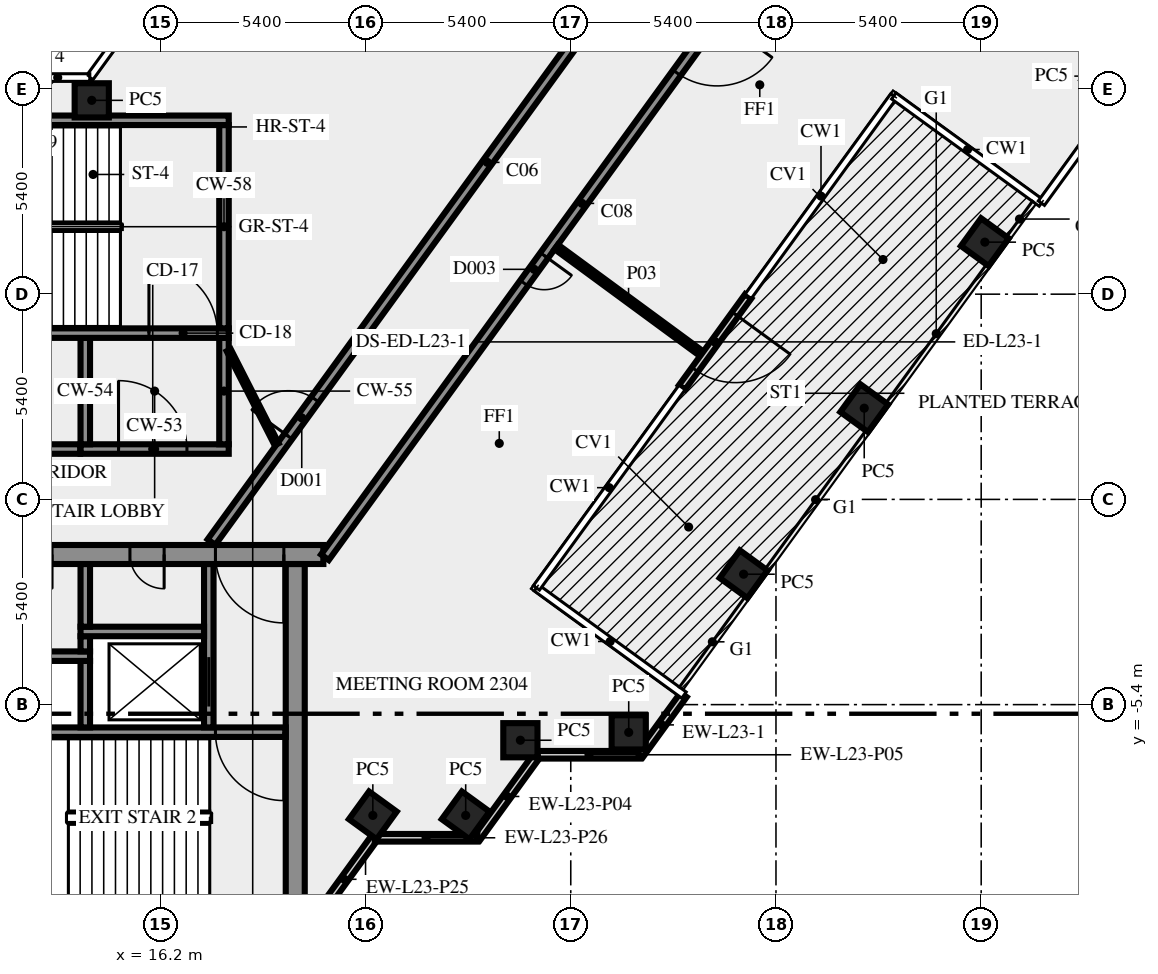
"""IFC4 building model, lengths in metres.
Left out: names, types, materials, properties, quantities, classifications, styles, units other than length and angle.
Written with IfcOpenShell. Run it as: python <this file> out.ifc"""

import sys

from ifc_helpers import new_model, si_unit, direction, frame, frame_2d, origin, origin_2d, place, context, subcontext, project, spatial, rectangle, extrude, element, fill, save


model = new_model("IFC4")
c1 = context("Model", 3, precision=1e-05, world=origin(), true_north=direction((0.0, 1.0)))
c2 = subcontext(c1, "Body", "Model", "MODEL_VIEW")
j1 = project(units=[si_unit("LENGTHUNIT", "METRE"), si_unit("PLANEANGLEUNIT", "RADIAN")], contexts=[c1])
p1 = place(None, origin())
s1 = spatial("IfcSite", under=j1, at=p1, CompositionType="ELEMENT")
p2 = place(p1, origin())
s2 = spatial("IfcBuilding", under=s1, at=p2, CompositionType="ELEMENT")
p3 = place(p2, frame((0.0, 0.0, 101.0)))
s3 = spatial("IfcBuildingStorey", under=s2, at=p3, CompositionType="ELEMENT", Elevation=101.0)
for number, where, z_axis, x_axis in (
    (1, (21.792, -8.315, 0.0), (0.0, 0.0, 1.0), (0.588, 0.809, 0.0)),
    (2, (24.235, -8.315, 0.0), (0.0, 0.0, 1.0), (0.588, 0.809, 0.0)),
    (3, (25.674, -6.337, 0.0), (0.0, 0.0, 1.0), (1.0, 0.0, 0.0)),
    (4, (28.525, -6.13, 0.0), (0.0, 0.0, 1.0), (1.0, 0.0, 0.0)),
    (5, (31.548, -1.969, 0.0), (0.0, 0.0, 1.0), (0.588, 0.809, 0.0)),
    (6, (34.722, 2.4, 0.0), (0.0, 0.0, 1.0), (0.588, 0.809, 0.0)),
    (7, (37.896, 6.769, 0.0), (0.0, 0.0, 1.0), (0.588, 0.809, 0.0)),
    (8, (14.395, 10.5, 0.0), (0.0, 0.0, 1.0), (-1.0, 0.0, 0.0)),
):
    element("IfcColumn", number, at=place(p3, frame(where, z_axis=z_axis, x_axis=x_axis)), inside=s3, PredefinedType="COLUMN", context=c2, shape_type="SweptSolid", body=[
        extrude(rectangle(XDim=0.9, YDim=0.9, at=origin_2d()), origin(), (0.0, 0.0, 1.0), 3.65),
    ])
p4 = place(p3, frame((24.533, -8.909, 0.0), z_axis=(0.0, 0.0, 1.0), x_axis=(0.587720002413, 0.809064397168, 0.0)))
e9 = element("IfcWall", 9, at=p4, inside=s3, PredefinedType="SOLIDWALL", context=c2, shape_type="SweptSolid", body=[
    extrude(rectangle(XDim=2.7, YDim=0.2, at=frame_2d((1.35, 0.0))), origin(), (0.0, 0.0, 1.0), 3.65),
])
p5 = place(p3, frame((26.13, -6.719, 0.0), z_axis=(0.0, 0.0, 1.0), x_axis=(1.0, 0.0, 0.0)))
e10 = element("IfcWall", 10, at=p5, inside=s3, PredefinedType="SOLIDWALL", context=c2, shape_type="SweptSolid", body=[
    extrude(rectangle(XDim=2.7, YDim=0.2, at=frame_2d((1.35, 0.0))), origin(), (0.0, 0.0, 1.0), 3.65),
])
p6 = place(p3, frame((28.82, -6.724, 0.0), z_axis=(0.0, 0.0, 1.0), x_axis=(0.587785613349, 0.809016732052, 0.0)))
e11 = element("IfcWall", 11, at=p6, inside=s3, PredefinedType="SOLIDWALL", context=c2, shape_type="SweptSolid", body=[
    extrude(rectangle(XDim=1.956, YDim=0.2, at=frame_2d((0.978, 0.0))), origin(), (0.0, 0.0, 1.0), 3.65),
])
p7 = place(p3, frame((31.669, 5.343, 0.0), z_axis=(0.0, 0.0, 1.0), x_axis=(-0.58782869016, -0.808985433135, 0.0)))
e12 = element("IfcWall", 12, at=p7, inside=s3, PredefinedType="SOLIDWALL", context=c2, shape_type="SweptSolid", body=[
    extrude(rectangle(XDim=2.963, YDim=0.2, at=frame_2d((1.481, 0.0))), origin(), (0.0, 0.0, 1.0), 3.65),
])
p8 = place(p7, frame((0.582, 0.0, 0.0)))
e13 = element("IfcOpeningElement", 13, at=p8, cuts=e12, PredefinedType="OPENING", context=c2, shape_type="SweptSolid", body=[
    extrude(rectangle(XDim=1.8, YDim=2.4, at=frame_2d((0.9, 1.2))), frame((0.0, 0.11, 0.0), z_axis=(0.0, -1.0, 0.0), x_axis=(1.0, 0.0, 0.0)), (0.0, 0.0, 1.0), 0.22),
])
p9 = place(p3, frame((20.253, -11.083, 0.0), z_axis=(0.0, 0.0, 1.0), x_axis=(0.587766567315, 0.809030569476, 0.0)))
e14 = element("IfcWall", 14, at=p9, inside=s3, PredefinedType="SOLIDWALL", context=c2, shape_type="SweptSolid", body=[
    extrude(rectangle(XDim=2.688, YDim=0.2, at=frame_2d((1.344, 0.0))), origin(), (0.0, 0.0, 1.0), 3.65),
])
p10 = place(p3, frame((21.843, -8.904, 0.0), z_axis=(0.0, 0.0, 1.0), x_axis=(1.0, 0.0, 0.0)))
e15 = element("IfcWall", 15, at=p10, inside=s3, PredefinedType="SOLIDWALL", context=c2, shape_type="SweptSolid", body=[
    extrude(rectangle(XDim=2.7, YDim=0.2, at=frame_2d((1.35, 0.0))), origin(), (0.0, 0.0, 1.0), 3.65),
])
p11 = place(p3, frame((19.75, -10.5, 0.0), z_axis=(0.0, 0.0, 1.0), x_axis=(0.0, 1.0, 0.0)))
e16 = element("IfcWall", 16, at=p11, inside=s3, PredefinedType="SHEAR", context=c2, shape_type="SweptSolid", body=[
    extrude(rectangle(XDim=8.8, YDim=0.5, at=frame_2d((4.4, 0.0))), origin(), (0.0, 0.0, 1.0), 3.65),
])
p12 = place(p3, frame((19.5, -6.125, 0.0), z_axis=(0.0, 0.0, 1.0), x_axis=(-1.0, 0.0, 0.0)))
e17 = element("IfcWall", 17, at=p12, inside=s3, PredefinedType="SHEAR", context=c2, shape_type="SweptSolid", body=[
    extrude(rectangle(XDim=8.05, YDim=0.25, at=frame_2d((4.025, 0.0))), origin(), (0.0, 0.0, 1.0), 3.65),
])
p13 = place(p12, frame((0.05, 0.0, 0.0)))
e18 = element("IfcOpeningElement", 18, at=p13, cuts=e17, PredefinedType="OPENING", context=c2, shape_type="SweptSolid", body=[
    extrude(rectangle(XDim=1.8, YDim=2.1, at=frame_2d((0.9, 1.05))), frame((0.0, 0.135, 0.0), z_axis=(0.0, -1.0, 0.0), x_axis=(1.0, 0.0, 0.0)), (0.0, 0.0, 1.0), 0.27),
])
p14 = place(p3, frame((14.225, -6.0, 0.0), z_axis=(0.0, 0.0, 1.0), x_axis=(0.0, 1.0, 0.0)))
e19 = element("IfcWall", 19, at=p14, inside=s3, PredefinedType="SHEAR", context=c2, shape_type="SweptSolid", body=[
    extrude(rectangle(XDim=1.75, YDim=0.25, at=frame_2d((0.875, 0.0))), origin(), (0.0, 0.0, 1.0), 3.65),
])
p15 = place(p3, frame((17.475, -6.0, 0.0), z_axis=(0.0, 0.0, 1.0), x_axis=(0.0, 1.0, 0.0)))
e20 = element("IfcWall", 20, at=p15, inside=s3, PredefinedType="SHEAR", context=c2, shape_type="SweptSolid", body=[
    extrude(rectangle(XDim=4.3, YDim=0.25, at=frame_2d((2.15, 0.0))), origin(), (0.0, 0.0, 1.0), 3.65),
])
p16 = place(p15, frame((0.55, 0.0, 0.0)))
e21 = element("IfcOpeningElement", 21, at=p16, cuts=e20, PredefinedType="OPENING", context=c2, shape_type="SweptSolid", body=[
    extrude(rectangle(XDim=1.3, YDim=2.1, at=frame_2d((0.65, 1.05))), frame((0.0, 0.135, 0.0), z_axis=(0.0, -1.0, 0.0), x_axis=(1.0, 0.0, 0.0)), (0.0, 0.0, 1.0), 0.27),
])
p17 = place(p3, frame((1.45, -4.125, 0.0), z_axis=(0.0, 0.0, 1.0), x_axis=(1.0, 0.0, 0.0)))
e22 = element("IfcWall", 22, at=p17, inside=s3, PredefinedType="SHEAR", context=c2, shape_type="SweptSolid", body=[
    extrude(rectangle(XDim=12.9, YDim=0.25, at=frame_2d((6.45, 0.0))), origin(), (0.0, 0.0, 1.0), 3.65),
])
p18 = place(p17, frame((0.7, 0.0, 0.0)))
e23 = element("IfcOpeningElement", 23, at=p18, cuts=e22, PredefinedType="OPENING", context=c2, shape_type="SweptSolid", body=[
    extrude(rectangle(XDim=1.3, YDim=2.1, at=frame_2d((0.65, 1.05))), frame((0.0, 0.135, 0.0), z_axis=(0.0, -1.0, 0.0), x_axis=(1.0, 0.0, 0.0)), (0.0, 0.0, 1.0), 0.27),
])
p19 = place(p3, frame((14.225, -4.0, 0.0), z_axis=(0.0, 0.0, 1.0), x_axis=(0.0, 1.0, 0.0)))
e24 = element("IfcWall", 24, at=p19, inside=s3, PredefinedType="SHEAR", context=c2, shape_type="SweptSolid", body=[
    extrude(rectangle(XDim=0.4, YDim=0.25, at=frame_2d((0.2, 0.0))), origin(), (0.0, 0.0, 1.0), 3.65),
])
p20 = place(p3, frame((14.1, -3.475, 0.0), z_axis=(0.0, 0.0, 1.0), x_axis=(1.0, 0.0, 0.0)))
e25 = element("IfcWall", 25, at=p20, inside=s3, PredefinedType="SHEAR", context=c2, shape_type="SweptSolid", body=[
    extrude(rectangle(XDim=3.25, YDim=0.25, at=frame_2d((1.625, 0.0))), origin(), (0.0, 0.0, 1.0), 3.65),
])
p21 = place(p3, frame((14.225, -3.35, 0.0), z_axis=(0.0, 0.0, 1.0), x_axis=(0.0, 1.0, 0.0)))
e26 = element("IfcWall", 26, at=p21, inside=s3, PredefinedType="SHEAR", context=c2, shape_type="SweptSolid", body=[
    extrude(rectangle(XDim=1.65, YDim=0.25, at=frame_2d((0.825, 0.0))), origin(), (0.0, 0.0, 1.0), 3.65),
])
p22 = place(p3, frame((20.49, -1.45, 0.0), z_axis=(0.0, 0.0, 1.0), x_axis=(-1.0, 0.0, 0.0)))
e27 = element("IfcWall", 27, at=p22, inside=s3, PredefinedType="SHEAR", context=c2, shape_type="SweptSolid", body=[
    extrude(rectangle(XDim=40.98, YDim=0.5, at=frame_2d((20.49, 0.0))), origin(), (0.0, 0.0, 1.0), 3.65),
])
p23 = place(p22, frame((38.14, 0.0, 0.0)))
e28 = element("IfcOpeningElement", 28, at=p23, cuts=e27, PredefinedType="OPENING", context=c2, shape_type="SweptSolid", body=[
    extrude(rectangle(XDim=1.8, YDim=2.1, at=frame_2d((0.9, 1.05))), frame((0.0, 0.26, 0.0), z_axis=(0.0, -1.0, 0.0), x_axis=(1.0, 0.0, 0.0)), (0.0, 0.0, 1.0), 0.52),
])
p24 = place(p22, frame((36.728, 0.0, 0.0)))
e29 = element("IfcOpeningElement", 29, at=p24, cuts=e27, PredefinedType="OPENING", context=c2, shape_type="SweptSolid", body=[
    extrude(rectangle(XDim=0.8, YDim=2.1, at=frame_2d((0.4, 1.05))), frame((0.0, 0.26, 0.0), z_axis=(0.0, -1.0, 0.0), x_axis=(1.0, 0.0, 0.0)), (0.0, 0.0, 1.0), 0.52),
])
p25 = place(p22, frame((35.153, 0.0, 0.0)))
e30 = element("IfcOpeningElement", 30, at=p25, cuts=e27, PredefinedType="OPENING", context=c2, shape_type="SweptSolid", body=[
    extrude(rectangle(XDim=0.8, YDim=2.1, at=frame_2d((0.4, 1.05))), frame((0.0, 0.26, 0.0), z_axis=(0.0, -1.0, 0.0), x_axis=(1.0, 0.0, 0.0)), (0.0, 0.0, 1.0), 0.52),
])
p26 = place(p22, frame((32.94, 0.0, 0.0)))
e31 = element("IfcOpeningElement", 31, at=p26, cuts=e27, PredefinedType="OPENING", context=c2, shape_type="SweptSolid", body=[
    extrude(rectangle(XDim=0.9, YDim=2.1, at=frame_2d((0.45, 1.05))), frame((0.0, 0.26, 0.0), z_axis=(0.0, -1.0, 0.0), x_axis=(1.0, 0.0, 0.0)), (0.0, 0.0, 1.0), 0.52),
])
p27 = place(p22, frame((19.59, 0.0, 0.0)))
e32 = element("IfcOpeningElement", 32, at=p27, cuts=e27, PredefinedType="OPENING", context=c2, shape_type="SweptSolid", body=[
    extrude(rectangle(XDim=2.0, YDim=2.1, at=frame_2d((1.0, 1.05))), frame((0.0, 0.26, 0.0), z_axis=(0.0, -1.0, 0.0), x_axis=(1.0, 0.0, 0.0)), (0.0, 0.0, 1.0), 0.52),
])
p28 = place(p22, frame((7.14, 0.0, 0.0)))
e33 = element("IfcOpeningElement", 33, at=p28, cuts=e27, PredefinedType="OPENING", context=c2, shape_type="SweptSolid", body=[
    extrude(rectangle(XDim=0.9, YDim=2.1, at=frame_2d((0.45, 1.05))), frame((0.0, 0.26, 0.0), z_axis=(0.0, -1.0, 0.0), x_axis=(1.0, 0.0, 0.0)), (0.0, 0.0, 1.0), 0.52),
])
p29 = place(p22, frame((4.19, 0.0, 0.0)))
e34 = element("IfcOpeningElement", 34, at=p29, cuts=e27, PredefinedType="OPENING", context=c2, shape_type="SweptSolid", body=[
    extrude(rectangle(XDim=0.9, YDim=2.1, at=frame_2d((0.45, 1.05))), frame((0.0, 0.26, 0.0), z_axis=(0.0, -1.0, 0.0), x_axis=(1.0, 0.0, 0.0)), (0.0, 0.0, 1.0), 0.52),
])
p30 = place(p22, frame((1.04, 0.0, 0.0)))
e35 = element("IfcOpeningElement", 35, at=p30, cuts=e27, PredefinedType="OPENING", context=c2, shape_type="SweptSolid", body=[
    extrude(rectangle(XDim=1.8, YDim=2.1, at=frame_2d((0.9, 1.05))), frame((0.0, 0.26, 0.0), z_axis=(0.0, -1.0, 0.0), x_axis=(1.0, 0.0, 0.0)), (0.0, 0.0, 1.0), 0.52),
])
p31 = place(p3, frame((14.1, 1.325, 0.0), z_axis=(0.0, 0.0, 1.0), x_axis=(1.0, 0.0, 0.0)))
e36 = element("IfcWall", 36, at=p31, inside=s3, PredefinedType="SHEAR", context=c2, shape_type="SweptSolid", body=[
    extrude(rectangle(XDim=3.9, YDim=0.25, at=frame_2d((1.95, 0.0))), origin(), (0.0, 0.0, 1.0), 3.65),
])
p32 = place(p31, frame((1.0, 0.0, 0.0)))
e37 = element("IfcOpeningElement", 37, at=p32, cuts=e36, PredefinedType="OPENING", context=c2, shape_type="SweptSolid", body=[
    extrude(rectangle(XDim=1.8, YDim=2.1, at=frame_2d((0.9, 1.05))), frame((0.0, 0.135, 0.0), z_axis=(0.0, -1.0, 0.0), x_axis=(1.0, 0.0, 0.0)), (0.0, 0.0, 1.0), 0.27),
])
for number, where, z_axis, x_axis in (
    (38, (14.225, 1.45, 0.0), (0.0, 0.0, 1.0), (0.0, 1.0, 0.0)),
    (39, (17.875, 1.45, 0.0), (0.0, 0.0, 1.0), (0.0, 1.0, 0.0)),
):
    element("IfcWall", number, at=place(p3, frame(where, z_axis=z_axis, x_axis=x_axis)), inside=s3, PredefinedType="SHEAR", context=c2, shape_type="SweptSolid", body=[
        extrude(rectangle(XDim=2.8, YDim=0.25, at=frame_2d((1.4, 0.0))), origin(), (0.0, 0.0, 1.0), 3.65),
    ])
p33 = place(p3, frame((7.5, 4.375, 0.0), z_axis=(0.0, 0.0, 1.0), x_axis=(1.0, 0.0, 0.0)))
e40 = element("IfcWall", 40, at=p33, inside=s3, PredefinedType="SHEAR", context=c2, shape_type="SweptSolid", body=[
    extrude(rectangle(XDim=10.5, YDim=0.25, at=frame_2d((5.25, 0.0))), origin(), (0.0, 0.0, 1.0), 3.65),
])
p34 = place(p33, frame((8.4, 0.0, 0.0)))
e41 = element("IfcOpeningElement", 41, at=p34, cuts=e40, PredefinedType="OPENING", context=c2, shape_type="SweptSolid", body=[
    extrude(rectangle(XDim=1.8, YDim=2.1, at=frame_2d((0.9, 1.05))), frame((0.0, 0.135, 0.0), z_axis=(0.0, -1.0, 0.0), x_axis=(1.0, 0.0, 0.0)), (0.0, 0.0, 1.0), 0.27),
])
p35 = place(p3, frame((17.875, 4.5, 0.0), z_axis=(0.0, 0.0, 1.0), x_axis=(0.0, 1.0, 0.0)))
e42 = element("IfcWall", 42, at=p35, inside=s3, PredefinedType="SHEAR", context=c2, shape_type="SweptSolid", body=[
    extrude(rectangle(XDim=5.35, YDim=0.25, at=frame_2d((2.675, 0.0))), origin(), (0.0, 0.0, 1.0), 3.65),
])
p36 = place(p3, frame((7.5, 9.975, 0.0), z_axis=(0.0, 0.0, 1.0), x_axis=(1.0, 0.0, 0.0)))
e43 = element("IfcWall", 43, at=p36, inside=s3, PredefinedType="SHEAR", context=c2, shape_type="SweptSolid", body=[
    extrude(rectangle(XDim=10.5, YDim=0.25, at=frame_2d((5.25, 0.0))), origin(), (0.0, 0.0, 1.0), 3.65),
])
p37 = place(p36, frame((2.0, 0.0, 1.0)))
e44 = element("IfcOpeningElement", 44, at=p37, cuts=e43, PredefinedType="OPENING", context=c2, shape_type="SweptSolid", body=[
    extrude(rectangle(XDim=1.2, YDim=1.2, at=frame_2d((0.6, 0.6))), frame((0.0, 0.135, 0.0), z_axis=(0.0, -1.0, 0.0), x_axis=(1.0, 0.0, 0.0)), (0.0, 0.0, 1.0), 0.27),
])
p38 = place(p3, frame((-14.09, 1.325, 0.0), z_axis=(0.0, 0.0, 1.0), x_axis=(1.0, 0.0, 0.0)))
e45 = element("IfcWall", 45, at=p38, inside=s3, PredefinedType="SOLIDWALL", context=c2, shape_type="SweptSolid", body=[
    extrude(rectangle(XDim=28.18, YDim=0.25, at=frame_2d((14.09, 0.0))), origin(), (0.0, 0.0, 1.0), 3.65),
])
p39 = place(p38, frame((19.738, 0.0, 0.0)))
e46 = element("IfcOpeningElement", 46, at=p39, cuts=e45, PredefinedType="OPENING", context=c2, shape_type="SweptSolid", body=[
    extrude(rectangle(XDim=1.2, YDim=2.1, at=frame_2d((0.6, 1.05))), frame((0.0, 0.135, 0.0), z_axis=(0.0, -1.0, 0.0), x_axis=(1.0, 0.0, 0.0)), (0.0, 0.0, 1.0), 0.27),
])
p40 = place(p38, frame((0.34, 0.0, 0.0)))
e47 = element("IfcOpeningElement", 47, at=p40, cuts=e45, PredefinedType="OPENING", context=c2, shape_type="SweptSolid", body=[
    extrude(rectangle(XDim=0.9, YDim=2.1, at=frame_2d((0.45, 1.05))), frame((0.0, 0.135, 0.0), z_axis=(0.0, -1.0, 0.0), x_axis=(1.0, 0.0, 0.0)), (0.0, 0.0, 1.0), 0.27),
])
p41 = place(p38, frame((21.638, 0.0, 0.0)))
e48 = element("IfcOpeningElement", 48, at=p41, cuts=e45, PredefinedType="OPENING", context=c2, shape_type="SweptSolid", body=[
    extrude(rectangle(XDim=0.9, YDim=2.1, at=frame_2d((0.45, 1.05))), frame((0.0, 0.135, 0.0), z_axis=(0.0, -1.0, 0.0), x_axis=(1.0, 0.0, 0.0)), (0.0, 0.0, 1.0), 0.27),
])
p42 = place(p3, frame((17.545, -1.125, 0.0), z_axis=(0.0, 0.0, 1.0), x_axis=(0.587791430994, 0.80901250525, 0.0)))
e49 = element("IfcWall", 49, at=p42, inside=s3, PredefinedType="SOLIDWALL", context=c2, shape_type="SweptSolid", body=[
    extrude(rectangle(XDim=24.703, YDim=0.25, at=frame_2d((12.352, 0.0))), origin(), (0.0, 0.0, 1.0), 3.65),
])
p43 = place(p42, frame((3.442, 0.0, 0.0)))
e50 = element("IfcOpeningElement", 50, at=p43, cuts=e49, PredefinedType="OPENING", context=c2, shape_type="SweptSolid", body=[
    extrude(rectangle(XDim=1.2, YDim=2.1, at=frame_2d((0.6, 1.05))), frame((0.0, 0.135, 0.0), z_axis=(0.0, -1.0, 0.0), x_axis=(1.0, 0.0, 0.0)), (0.0, 0.0, 1.0), 0.27),
])
p44 = place(p42, frame((23.329, 0.0, 0.0)))
e51 = element("IfcOpeningElement", 51, at=p44, cuts=e49, PredefinedType="OPENING", context=c2, shape_type="SweptSolid", body=[
    extrude(rectangle(XDim=0.9, YDim=2.1, at=frame_2d((0.45, 1.05))), frame((0.0, 0.135, 0.0), z_axis=(0.0, -1.0, 0.0), x_axis=(1.0, 0.0, 0.0)), (0.0, 0.0, 1.0), 0.27),
])
p45 = place(p3, frame((34.062, 17.101, 0.0), z_axis=(0.0, 0.0, 1.0), x_axis=(-0.58778129431, -0.809019870003, 0.0)))
e52 = element("IfcWall", 52, at=p45, inside=s3, PredefinedType="SOLIDWALL", context=c2, shape_type="SweptSolid", body=[
    extrude(rectangle(XDim=23.021, YDim=0.25, at=frame_2d((11.51, 0.0))), origin(), (0.0, 0.0, 1.0), 3.65),
])
p46 = place(p45, frame((5.465, 0.0, 0.0)))
e53 = element("IfcOpeningElement", 53, at=p46, cuts=e52, PredefinedType="OPENING", context=c2, shape_type="SweptSolid", body=[
    extrude(rectangle(XDim=1.8, YDim=2.1, at=frame_2d((0.9, 1.05))), frame((0.0, 0.135, 0.0), z_axis=(0.0, -1.0, 0.0), x_axis=(1.0, 0.0, 0.0)), (0.0, 0.0, 1.0), 0.27),
])
p47 = place(p45, frame((13.205, 0.0, 0.0)))
e54 = element("IfcOpeningElement", 54, at=p47, cuts=e52, PredefinedType="OPENING", context=c2, shape_type="SweptSolid", body=[
    extrude(rectangle(XDim=0.9, YDim=2.1, at=frame_2d((0.45, 1.05))), frame((0.0, 0.135, 0.0), z_axis=(0.0, -1.0, 0.0), x_axis=(1.0, 0.0, 0.0)), (0.0, 0.0, 1.0), 0.27),
])
p48 = place(p3, frame((42.106, 11.54, 0.0), z_axis=(0.0, 0.0, 1.0), x_axis=(-0.808982149318, 0.587833209409, 0.0)))
e55 = element("IfcWall", 55, at=p48, inside=s3, PredefinedType="PARTITIONING", context=c2, shape_type="SweptSolid", body=[
    extrude(rectangle(XDim=9.651, YDim=0.15, at=frame_2d((4.825, 0.0))), origin(), (0.0, 0.0, 1.0), 2.75),
])
p49 = place(p3, frame((26.619, 6.643, 0.0), z_axis=(0.0, 0.0, 1.0), x_axis=(0.805845547864, -0.592125791524, 0.0)))
e56 = element("IfcWall", 56, at=p49, inside=s3, PredefinedType="PARTITIONING", context=c2, shape_type="SweptSolid", body=[
    extrude(rectangle(XDim=4.72, YDim=0.15, at=frame_2d((2.36, 0.0))), origin(), (0.0, 0.0, 1.0), 3.65),
])
p50 = place(p3, frame((18.0, 3.925, 0.0), z_axis=(0.0, 0.0, 1.0), x_axis=(0.453950796792, -0.891026752736, 0.0)))
e57 = element("IfcWall", 57, at=p50, inside=s3, PredefinedType="PARTITIONING", context=c2, shape_type="SweptSolid", body=[
    extrude(rectangle(XDim=2.778, YDim=0.12, at=frame_2d((1.389, 0.0))), origin(), (0.0, 0.0, 1.0), 3.65),
])
p51 = place(p8, origin())
e58 = element("IfcDoor", 58, at=p51, inside=s3, OperationType="DOUBLE_DOOR_SINGLE_SWING", PredefinedType="DOOR", context=c2, shape_type="SweptSolid", body=[
    extrude(rectangle(XDim=1.8, YDim=2.4, at=frame_2d((0.9, 1.2))), frame((0.0, 0.025, 0.0), z_axis=(0.0, -1.0, 0.0), x_axis=(1.0, 0.0, 0.0)), (0.0, 0.0, 1.0), 0.05),
])
fill(e13, e58)
p52 = place(p13, origin())
e59 = element("IfcDoor", 59, at=p52, inside=s3, OperationType="DOUBLE_DOOR_SINGLE_SWING", PredefinedType="DOOR", context=c2, shape_type="SweptSolid", body=[
    extrude(rectangle(XDim=1.8, YDim=2.1, at=frame_2d((0.9, 1.05))), frame((0.0, 0.025, 0.0), z_axis=(0.0, -1.0, 0.0), x_axis=(1.0, 0.0, 0.0)), (0.0, 0.0, 1.0), 0.05),
])
fill(e18, e59)
p53 = place(p16, origin())
e60 = element("IfcDoor", 60, at=p53, inside=s3, OperationType="DOUBLE_DOOR_SLIDING", PredefinedType="DOOR", context=c2, shape_type="SweptSolid", body=[
    extrude(rectangle(XDim=1.3, YDim=2.1, at=frame_2d((0.65, 1.05))), frame((0.0, 0.025, 0.0), z_axis=(0.0, -1.0, 0.0), x_axis=(1.0, 0.0, 0.0)), (0.0, 0.0, 1.0), 0.05),
])
fill(e21, e60)
p54 = place(p29, origin())
e61 = element("IfcDoor", 61, at=p54, inside=s3, OperationType="SINGLE_SWING_LEFT", PredefinedType="DOOR", context=c2, shape_type="SweptSolid", body=[
    extrude(rectangle(XDim=0.9, YDim=2.1, at=frame_2d((0.45, 1.05))), frame((0.0, 0.025, 0.0), z_axis=(0.0, -1.0, 0.0), x_axis=(1.0, 0.0, 0.0)), (0.0, 0.0, 1.0), 0.05),
])
fill(e34, e61)
p55 = place(p30, origin())
e62 = element("IfcDoor", 62, at=p55, inside=s3, OperationType="DOUBLE_DOOR_SINGLE_SWING", PredefinedType="DOOR", context=c2, shape_type="SweptSolid", body=[
    extrude(rectangle(XDim=1.8, YDim=2.1, at=frame_2d((0.9, 1.05))), frame((0.0, 0.025, 0.0), z_axis=(0.0, -1.0, 0.0), x_axis=(1.0, 0.0, 0.0)), (0.0, 0.0, 1.0), 0.05),
])
fill(e35, e62)
p56 = place(p32, origin())
e63 = element("IfcDoor", 63, at=p56, inside=s3, OperationType="DOUBLE_DOOR_SINGLE_SWING", PredefinedType="DOOR", context=c2, shape_type="SweptSolid", body=[
    extrude(rectangle(XDim=1.8, YDim=2.1, at=frame_2d((0.9, 1.05))), frame((0.0, 0.025, 0.0), z_axis=(0.0, -1.0, 0.0), x_axis=(1.0, 0.0, 0.0)), (0.0, 0.0, 1.0), 0.05),
])
fill(e37, e63)
p57 = place(p34, origin())
e64 = element("IfcDoor", 64, at=p57, inside=s3, OperationType="DOUBLE_DOOR_SINGLE_SWING", PredefinedType="DOOR", context=c2, shape_type="SweptSolid", body=[
    extrude(rectangle(XDim=1.8, YDim=2.1, at=frame_2d((0.9, 1.05))), frame((0.0, 0.025, 0.0), z_axis=(0.0, -1.0, 0.0), x_axis=(1.0, 0.0, 0.0)), (0.0, 0.0, 1.0), 0.05),
])
fill(e41, e64)
p58 = place(p43, origin())
e65 = element("IfcDoor", 65, at=p58, inside=s3, OperationType="SINGLE_SWING_LEFT", PredefinedType="DOOR", context=c2, shape_type="SweptSolid", body=[
    extrude(rectangle(XDim=1.2, YDim=2.1, at=frame_2d((0.6, 1.05))), frame((0.0, 0.025, 0.0), z_axis=(0.0, -1.0, 0.0), x_axis=(1.0, 0.0, 0.0)), (0.0, 0.0, 1.0), 0.05),
])
fill(e50, e65)
p59 = place(p46, origin())
e66 = element("IfcDoor", 66, at=p59, inside=s3, OperationType="DOUBLE_DOOR_SINGLE_SWING", PredefinedType="DOOR", context=c2, shape_type="SweptSolid", body=[
    extrude(rectangle(XDim=1.8, YDim=2.1, at=frame_2d((0.9, 1.05))), frame((0.0, 0.025, 0.0), z_axis=(0.0, -1.0, 0.0), x_axis=(1.0, 0.0, 0.0)), (0.0, 0.0, 1.0), 0.05),
])
fill(e53, e66)
p60 = place(p47, origin())
e67 = element("IfcDoor", 67, at=p60, inside=s3, OperationType="SINGLE_SWING_LEFT", PredefinedType="DOOR", context=c2, shape_type="SweptSolid", body=[
    extrude(rectangle(XDim=0.9, YDim=2.1, at=frame_2d((0.45, 1.05))), frame((0.0, 0.025, 0.0), z_axis=(0.0, -1.0, 0.0), x_axis=(1.0, 0.0, 0.0)), (0.0, 0.0, 1.0), 0.05),
])
fill(e54, e67)
save(model, sys.argv[1])
